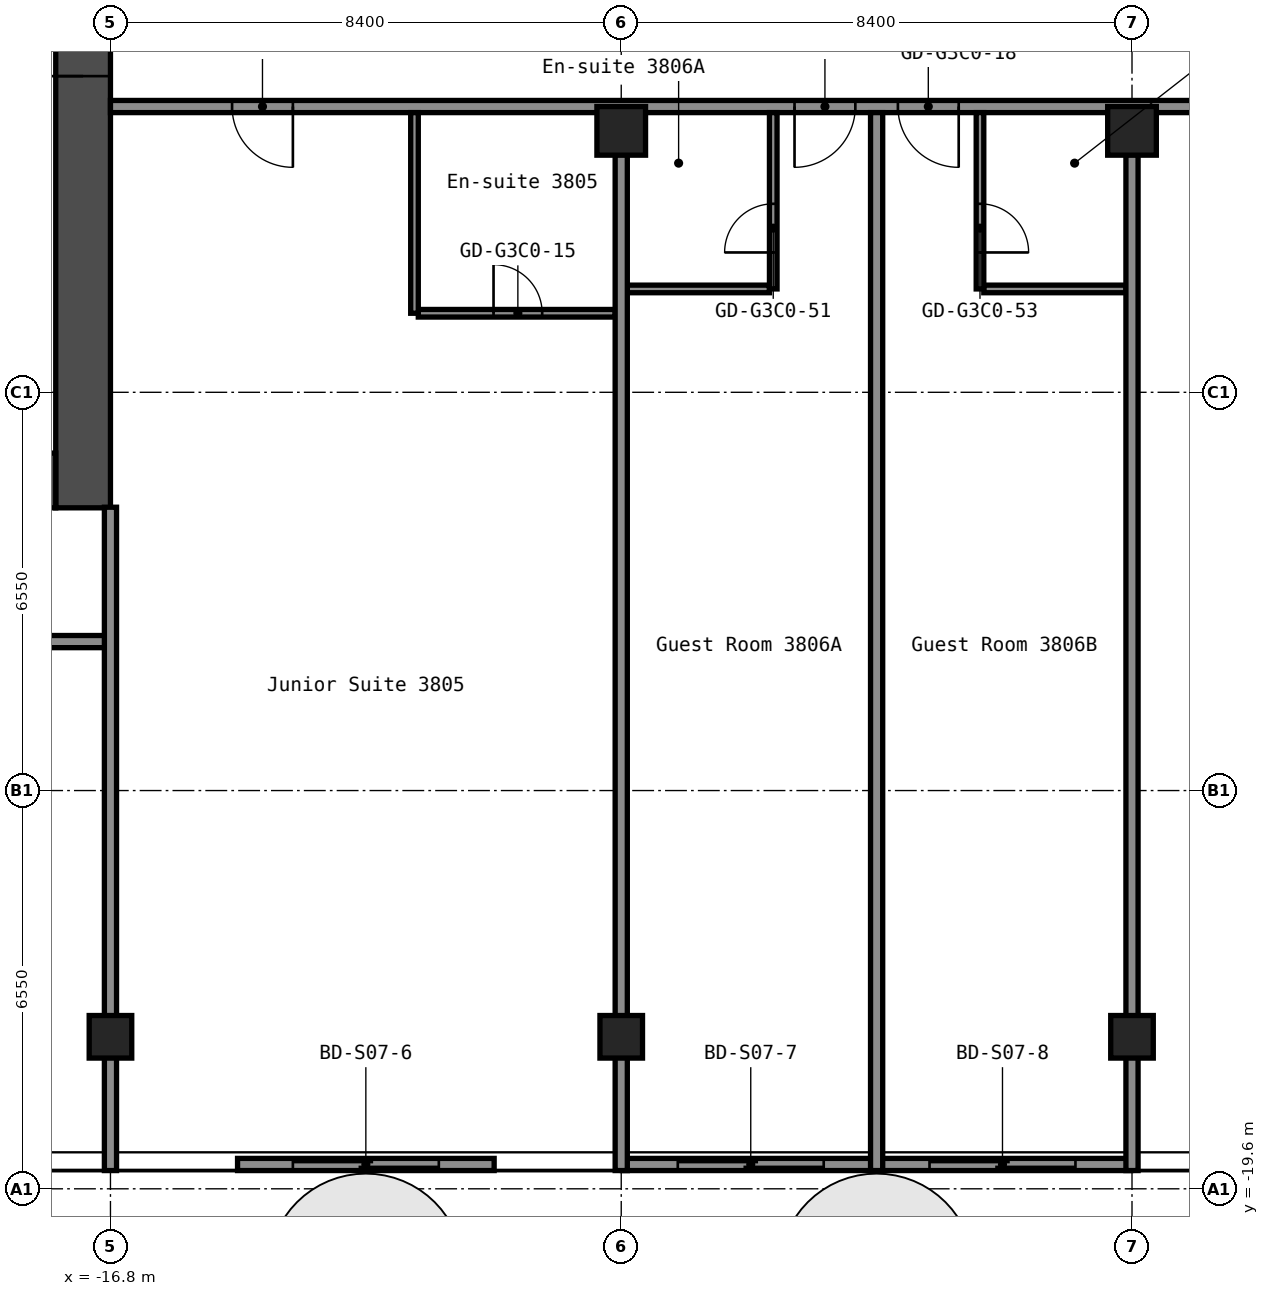
"""IFC4 building model, lengths in metres.
Left out: names, types, materials, properties, quantities, classifications, styles, units other than length and angle.
Written with IfcOpenShell. Run it as: python <this file> out.ifc"""

import sys

from ifc_helpers import new_model, si_unit, direction, frame, frame_2d, origin, origin_2d, place, context, subcontext, project, spatial, rectangle, hollow_rectangle, extrude, element, fill, save


model = new_model("IFC4")
c1 = context("Model", 3, precision=1e-05, world=origin(), true_north=direction((0.0, 1.0)))
c2 = subcontext(c1, "Body", "Model", "MODEL_VIEW")
j1 = project(units=[si_unit("LENGTHUNIT", "METRE"), si_unit("PLANEANGLEUNIT", "RADIAN")], contexts=[c1])
p1 = place(None, origin())
s1 = spatial("IfcSite", under=j1, at=p1, CompositionType="ELEMENT")
p2 = place(p1, origin())
s2 = spatial("IfcBuilding", under=s1, at=p2, CompositionType="ELEMENT")
p3 = place(p2, frame((0.0, 0.0, 137.4)))
s3 = spatial("IfcBuildingStorey", under=s2, at=p3, CompositionType="ELEMENT", Elevation=137.4)
for number, where, z_axis, x_axis in (
    (1, (-16.8, -17.1, 0.0), (0.0, 0.0, 1.0), (1.0, 0.0, 0.0)),
    (2, (-8.4, -17.1, 0.0), (0.0, 0.0, 1.0), (1.0, 0.0, 0.0)),
):
    element("IfcColumn", number, at=place(p3, frame(where, z_axis=z_axis, x_axis=x_axis)), inside=s3, PredefinedType="COLUMN", context=c2, shape_type="SweptSolid", body=[
        extrude(hollow_rectangle(XDim=0.7, YDim=0.7, WallThickness=0.028, at=origin_2d()), origin(), (0.0, 0.0, 1.0), 2.75),
    ])
p4 = place(p3, frame((-8.4, -2.2, 0.0), z_axis=(0.0, 0.0, 1.0), x_axis=(1.0, 0.0, 0.0)))
e3 = element("IfcColumn", 3, at=p4, inside=s3, PredefinedType="COLUMN", context=c2, shape_type="SweptSolid", body=[
    extrude(hollow_rectangle(XDim=0.8, YDim=0.8, WallThickness=0.032, at=origin_2d()), origin(), (0.0, 0.0, 1.0), 2.75),
])
p5 = place(p3, frame((0.0, -17.1, 0.0), z_axis=(0.0, 0.0, 1.0), x_axis=(1.0, 0.0, 0.0)))
e4 = element("IfcColumn", 4, at=p5, inside=s3, PredefinedType="COLUMN", context=c2, shape_type="SweptSolid", body=[
    extrude(hollow_rectangle(XDim=0.7, YDim=0.7, WallThickness=0.028, at=origin_2d()), origin(), (0.0, 0.0, 1.0), 2.75),
])
p6 = place(p3, frame((0.0, -2.2, 0.0), z_axis=(0.0, 0.0, 1.0), x_axis=(1.0, 0.0, 0.0)))
e5 = element("IfcColumn", 5, at=p6, inside=s3, PredefinedType="COLUMN", context=c2, shape_type="SweptSolid", body=[
    extrude(hollow_rectangle(XDim=0.8, YDim=0.8, WallThickness=0.032, at=origin_2d()), origin(), (0.0, 0.0, 1.0), 2.75),
])
p7 = place(p3, frame((-17.25, -8.4, 0.0), z_axis=(0.0, 0.0, 1.0), x_axis=(0.0, 1.0, 0.0)))
e6 = element("IfcWall", 6, at=p7, inside=s3, PredefinedType="SHEAR", context=c2, shape_type="SweptSolid", body=[
    extrude(rectangle(XDim=16.8, YDim=0.9, at=frame_2d((8.4, 0.0))), origin(), (0.0, 0.0, 1.0), 2.75),
])
p8 = place(p7, frame((7.1, 0.0, 0.0)))
e7 = element("IfcOpeningElement", 7, at=p8, cuts=e6, PredefinedType="OPENING", context=c2, shape_type="SweptSolid", body=[
    extrude(rectangle(XDim=1.6, YDim=2.1, at=frame_2d((0.8, 1.05))), frame((0.0, 0.46, 0.0), z_axis=(0.0, -1.0, 0.0), x_axis=(1.0, 0.0, 0.0)), (0.0, 0.0, 1.0), 0.92),
])
p9 = place(p3, frame((-32.7, -7.95, 0.0), z_axis=(0.0, 0.0, 1.0), x_axis=(1.0, 0.0, 0.0)))
e8 = element("IfcWall", 8, at=p9, inside=s3, PredefinedType="SHEAR", context=c2, shape_type="SweptSolid", body=[
    extrude(rectangle(XDim=15.0, YDim=0.9, at=frame_2d((7.5, 0.0))), origin(), (0.0, 0.0, 1.0), 2.75),
])
p10 = place(p9, frame((11.45, 0.0, 0.0)))
e9 = element("IfcOpeningElement", 9, at=p10, cuts=e8, PredefinedType="OPENING", context=c2, shape_type="SweptSolid", body=[
    extrude(rectangle(XDim=1.0, YDim=2.1, at=frame_2d((0.5, 1.05))), frame((0.0, 0.46, 0.0), z_axis=(0.0, -1.0, 0.0), x_axis=(1.0, 0.0, 0.0)), (0.0, 0.0, 1.0), 0.92),
])
p11 = place(p3, frame((-42.7, -10.6, 0.0), z_axis=(0.0, 0.0, 1.0), x_axis=(1.0, 0.0, 0.0)))
e10 = element("IfcWall", 10, at=p11, inside=s3, PredefinedType="PARTITIONING", context=c2, shape_type="SweptSolid", body=[
    extrude(rectangle(XDim=25.9, YDim=0.2, at=frame_2d((12.95, 0.0))), origin(), (0.0, 0.0, 1.0), 2.75),
])
p12 = place(p11, frame((2.665, 0.0, 0.0)))
e11 = element("IfcOpeningElement", 11, at=p12, cuts=e10, PredefinedType="OPENING", context=c2, shape_type="SweptSolid", body=[
    extrude(rectangle(XDim=0.9, YDim=2.1, at=frame_2d((0.45, 1.05))), frame((0.0, 0.11, 0.0), z_axis=(0.0, -1.0, 0.0), x_axis=(1.0, 0.0, 0.0)), (0.0, 0.0, 1.0), 0.22),
])
p13 = place(p11, frame((7.065, 0.0, 0.0)))
e12 = element("IfcOpeningElement", 12, at=p13, cuts=e10, PredefinedType="OPENING", context=c2, shape_type="SweptSolid", body=[
    extrude(rectangle(XDim=0.9, YDim=2.1, at=frame_2d((0.45, 1.05))), frame((0.0, 0.11, 0.0), z_axis=(0.0, -1.0, 0.0), x_axis=(1.0, 0.0, 0.0)), (0.0, 0.0, 1.0), 0.22),
])
p14 = place(p11, frame((12.8, 0.0, 0.0)))
e13 = element("IfcOpeningElement", 13, at=p14, cuts=e10, PredefinedType="OPENING", context=c2, shape_type="SweptSolid", body=[
    extrude(rectangle(XDim=1.0, YDim=2.1, at=frame_2d((0.5, 1.05))), frame((0.0, 0.11, 0.0), z_axis=(0.0, -1.0, 0.0), x_axis=(1.0, 0.0, 0.0)), (0.0, 0.0, 1.0), 0.22),
])
p15 = place(p11, frame((21.2, 0.0, 0.0)))
e14 = element("IfcOpeningElement", 14, at=p15, cuts=e10, PredefinedType="OPENING", context=c2, shape_type="SweptSolid", body=[
    extrude(rectangle(XDim=1.0, YDim=2.1, at=frame_2d((0.5, 1.05))), frame((0.0, 0.11, 0.0), z_axis=(0.0, -1.0, 0.0), x_axis=(1.0, 0.0, 0.0)), (0.0, 0.0, 1.0), 0.22),
])
p16 = place(p3, frame((-11.738, -5.2, 0.0), z_axis=(0.0, 0.0, 1.0), x_axis=(1.0, 0.0, 0.0)))
e15 = element("IfcWall", 15, at=p16, inside=s3, PredefinedType="PARTITIONING", context=c2, shape_type="SweptSolid", body=[
    extrude(rectangle(XDim=3.238, YDim=0.125, at=frame_2d((1.619, 0.0))), origin(), (0.0, 0.0, 1.0), 2.75),
])
p17 = place(p16, frame((1.238, 0.0, 0.0)))
e16 = element("IfcOpeningElement", 16, at=p17, cuts=e15, PredefinedType="OPENING", context=c2, shape_type="SweptSolid", body=[
    extrude(rectangle(XDim=0.8, YDim=2.1, at=frame_2d((0.4, 1.05))), frame((0.0, 0.073, 0.0), z_axis=(0.0, -1.0, 0.0), x_axis=(1.0, 0.0, 0.0)), (0.0, 0.0, 1.0), 0.145),
])
p18 = place(p3, frame((-8.3, -4.8, 0.0), z_axis=(0.0, 0.0, 1.0), x_axis=(1.0, 0.0, 0.0)))
e17 = element("IfcWall", 17, at=p18, inside=s3, PredefinedType="PARTITIONING", context=c2, shape_type="SweptSolid", body=[
    extrude(rectangle(XDim=2.338, YDim=0.125, at=frame_2d((1.169, 0.0))), origin(), (0.0, 0.0, 1.0), 2.75),
])
p19 = place(p3, frame((-2.438, -4.8, 0.0), z_axis=(0.0, 0.0, 1.0), x_axis=(1.0, 0.0, 0.0)))
e18 = element("IfcWall", 18, at=p19, inside=s3, PredefinedType="PARTITIONING", context=c2, shape_type="SweptSolid", body=[
    extrude(rectangle(XDim=2.337, YDim=0.125, at=frame_2d((1.169, 0.0))), origin(), (0.0, 0.0, 1.0), 2.75),
])
p20 = place(p3, frame((-16.8, -1.8, 0.0), z_axis=(0.0, 0.0, 1.0), x_axis=(1.0, 0.0, 0.0)))
e19 = element("IfcWall", 19, at=p20, inside=s3, PredefinedType="PARTITIONING", context=c2, shape_type="SweptSolid", body=[
    extrude(rectangle(XDim=33.6, YDim=0.2, at=frame_2d((16.8, 0.0))), origin(), (0.0, 0.0, 1.0), 2.75),
])
p21 = place(p20, frame((2.0, 0.0, 0.0)))
e20 = element("IfcOpeningElement", 20, at=p21, cuts=e19, PredefinedType="OPENING", context=c2, shape_type="SweptSolid", body=[
    extrude(rectangle(XDim=1.0, YDim=2.1, at=frame_2d((0.5, 1.05))), frame((0.0, 0.11, 0.0), z_axis=(0.0, -1.0, 0.0), x_axis=(1.0, 0.0, 0.0)), (0.0, 0.0, 1.0), 0.22),
])
p22 = place(p20, frame((11.25, 0.0, 0.0)))
e21 = element("IfcOpeningElement", 21, at=p22, cuts=e19, PredefinedType="OPENING", context=c2, shape_type="SweptSolid", body=[
    extrude(rectangle(XDim=1.0, YDim=2.1, at=frame_2d((0.5, 1.05))), frame((0.0, 0.11, 0.0), z_axis=(0.0, -1.0, 0.0), x_axis=(1.0, 0.0, 0.0)), (0.0, 0.0, 1.0), 0.22),
])
p23 = place(p20, frame((12.95, 0.0, 0.0)))
e22 = element("IfcOpeningElement", 22, at=p23, cuts=e19, PredefinedType="OPENING", context=c2, shape_type="SweptSolid", body=[
    extrude(rectangle(XDim=1.0, YDim=2.1, at=frame_2d((0.5, 1.05))), frame((0.0, 0.11, 0.0), z_axis=(0.0, -1.0, 0.0), x_axis=(1.0, 0.0, 0.0)), (0.0, 0.0, 1.0), 0.22),
])
p24 = place(p20, frame((17.86, 0.0, 0.0)))
e23 = element("IfcOpeningElement", 23, at=p24, cuts=e19, PredefinedType="OPENING", context=c2, shape_type="SweptSolid", body=[
    extrude(rectangle(XDim=0.9, YDim=2.1, at=frame_2d((0.45, 1.05))), frame((0.0, 0.11, 0.0), z_axis=(0.0, -1.0, 0.0), x_axis=(1.0, 0.0, 0.0)), (0.0, 0.0, 1.0), 0.22),
])
p25 = place(p20, frame((22.06, 0.0, 0.0)))
e24 = element("IfcOpeningElement", 24, at=p25, cuts=e19, PredefinedType="OPENING", context=c2, shape_type="SweptSolid", body=[
    extrude(rectangle(XDim=0.9, YDim=2.1, at=frame_2d((0.45, 1.05))), frame((0.0, 0.11, 0.0), z_axis=(0.0, -1.0, 0.0), x_axis=(1.0, 0.0, 0.0)), (0.0, 0.0, 1.0), 0.22),
])
p26 = place(p20, frame((28.05, 0.0, 0.0)))
e25 = element("IfcOpeningElement", 25, at=p26, cuts=e19, PredefinedType="OPENING", context=c2, shape_type="SweptSolid", body=[
    extrude(rectangle(XDim=1.0, YDim=2.1, at=frame_2d((0.5, 1.05))), frame((0.0, 0.11, 0.0), z_axis=(0.0, -1.0, 0.0), x_axis=(1.0, 0.0, 0.0)), (0.0, 0.0, 1.0), 0.22),
])
p27 = place(p20, frame((29.75, 0.0, 0.0)))
e26 = element("IfcOpeningElement", 26, at=p27, cuts=e19, PredefinedType="OPENING", context=c2, shape_type="SweptSolid", body=[
    extrude(rectangle(XDim=1.0, YDim=2.1, at=frame_2d((0.5, 1.05))), frame((0.0, 0.11, 0.0), z_axis=(0.0, -1.0, 0.0), x_axis=(1.0, 0.0, 0.0)), (0.0, 0.0, 1.0), 0.22),
])
p28 = place(p3, frame((-16.8, -19.3, 0.0), z_axis=(0.0, 0.0, 1.0), x_axis=(0.0, 1.0, 0.0)))
e27 = element("IfcWall", 27, at=p28, inside=s3, PredefinedType="PARTITIONING", context=c2, shape_type="SweptSolid", body=[
    extrude(rectangle(XDim=10.91, YDim=0.2, at=frame_2d((5.455, 0.0))), origin(), (0.0, 0.0, 1.0), 2.75),
])
p29 = place(p3, frame((-11.8, -5.2, 0.0), z_axis=(0.0, 0.0, 1.0), x_axis=(0.0, 1.0, 0.0)))
e28 = element("IfcWall", 28, at=p29, inside=s3, PredefinedType="PARTITIONING", context=c2, shape_type="SweptSolid", body=[
    extrude(rectangle(XDim=3.3, YDim=0.125, at=frame_2d((1.65, 0.0))), origin(), (0.0, 0.0, 1.0), 2.75),
])
p30 = place(p3, frame((-8.4, -19.3, 0.0), z_axis=(0.0, 0.0, 1.0), x_axis=(0.0, 1.0, 0.0)))
e29 = element("IfcWall", 29, at=p30, inside=s3, PredefinedType="PARTITIONING", context=c2, shape_type="SweptSolid", body=[
    extrude(rectangle(XDim=16.71, YDim=0.2, at=frame_2d((8.355, 0.0))), origin(), (0.0, 0.0, 1.0), 2.75),
])
p31 = place(p3, frame((-5.9, -4.8, 0.0), z_axis=(0.0, 0.0, 1.0), x_axis=(0.0, 1.0, 0.0)))
e30 = element("IfcWall", 30, at=p31, inside=s3, PredefinedType="PARTITIONING", context=c2, shape_type="SweptSolid", body=[
    extrude(rectangle(XDim=2.9, YDim=0.125, at=frame_2d((1.45, 0.0))), origin(), (0.0, 0.0, 1.0), 2.75),
])
p32 = place(p31, frame((0.6, 0.0, 0.0)))
e31 = element("IfcOpeningElement", 31, at=p32, cuts=e30, PredefinedType="OPENING", context=c2, shape_type="SweptSolid", body=[
    extrude(rectangle(XDim=0.8, YDim=2.1, at=frame_2d((0.4, 1.05))), frame((0.0, 0.073, 0.0), z_axis=(0.0, -1.0, 0.0), x_axis=(1.0, 0.0, 0.0)), (0.0, 0.0, 1.0), 0.145),
])
p33 = place(p3, frame((-4.2, -19.3, 0.0), z_axis=(0.0, 0.0, 1.0), x_axis=(0.0, 1.0, 0.0)))
e32 = element("IfcWall", 32, at=p33, inside=s3, PredefinedType="PARTITIONING", context=c2, shape_type="SweptSolid", body=[
    extrude(rectangle(XDim=17.4, YDim=0.2, at=frame_2d((8.7, 0.0))), origin(), (0.0, 0.0, 1.0), 2.75),
])
p34 = place(p3, frame((-2.5, -4.8, 0.0), z_axis=(0.0, 0.0, 1.0), x_axis=(0.0, 1.0, 0.0)))
e33 = element("IfcWall", 33, at=p34, inside=s3, PredefinedType="PARTITIONING", context=c2, shape_type="SweptSolid", body=[
    extrude(rectangle(XDim=2.9, YDim=0.125, at=frame_2d((1.45, 0.0))), origin(), (0.0, 0.0, 1.0), 2.75),
])
p35 = place(p34, frame((0.6, 0.0, 0.0)))
e34 = element("IfcOpeningElement", 34, at=p35, cuts=e33, PredefinedType="OPENING", context=c2, shape_type="SweptSolid", body=[
    extrude(rectangle(XDim=0.8, YDim=2.1, at=frame_2d((0.4, 1.05))), frame((0.0, 0.073, 0.0), z_axis=(0.0, -1.0, 0.0), x_axis=(1.0, 0.0, 0.0)), (0.0, 0.0, 1.0), 0.145),
])
p36 = place(p3, frame((0.0, -19.3, 0.0), z_axis=(0.0, 0.0, 1.0), x_axis=(0.0, 1.0, 0.0)))
e35 = element("IfcWall", 35, at=p36, inside=s3, PredefinedType="PARTITIONING", context=c2, shape_type="SweptSolid", body=[
    extrude(rectangle(XDim=16.71, YDim=0.2, at=frame_2d((8.355, 0.0))), origin(), (0.0, 0.0, 1.0), 2.75),
])
p37 = place(p3, frame((-14.71, -19.2, 0.0), z_axis=(0.0, 0.0, 1.0), x_axis=(1.0, 0.0, 0.0)))
p38 = place(p37, frame((0.91, 0.0, 0.0)))
p39 = place(p38, frame((2.4, 0.0, 0.0), z_axis=(0.0, 0.0, 1.0), x_axis=(-1.0, 0.0, 0.0)))
e36 = element("IfcDoor", 36, at=p39, inside=s3, OperationType="SLIDING_TO_LEFT", PredefinedType="DOOR", context=c2, shape_type="SweptSolid", body=[
    extrude(rectangle(XDim=2.4, YDim=2.2, at=frame_2d((1.2, 1.1))), frame((0.0, 0.025, 0.0), z_axis=(0.0, -1.0, 0.0), x_axis=(1.0, 0.0, 0.0)), (0.0, 0.0, 1.0), 0.05),
])
p40 = place(p3, frame((-8.38, -19.2, 0.0), z_axis=(0.0, 0.0, 1.0), x_axis=(1.0, 0.0, 0.0)))
p41 = place(p40, frame((0.91, 0.0, 0.0)))
p42 = place(p41, frame((2.4, 0.0, 0.0), z_axis=(0.0, 0.0, 1.0), x_axis=(-1.0, 0.0, 0.0)))
e37 = element("IfcDoor", 37, at=p42, inside=s3, OperationType="SLIDING_TO_LEFT", PredefinedType="DOOR", context=c2, shape_type="SweptSolid", body=[
    extrude(rectangle(XDim=2.4, YDim=2.2, at=frame_2d((1.2, 1.1))), frame((0.0, 0.025, 0.0), z_axis=(0.0, -1.0, 0.0), x_axis=(1.0, 0.0, 0.0)), (0.0, 0.0, 1.0), 0.05),
])
p43 = place(p3, frame((-4.24, -19.2, 0.0), z_axis=(0.0, 0.0, 1.0), x_axis=(1.0, 0.0, 0.0)))
p44 = place(p43, frame((0.91, 0.0, 0.0)))
p45 = place(p44, frame((2.4, 0.0, 0.0), z_axis=(0.0, 0.0, 1.0), x_axis=(-1.0, 0.0, 0.0)))
e38 = element("IfcDoor", 38, at=p45, inside=s3, OperationType="SLIDING_TO_LEFT", PredefinedType="DOOR", context=c2, shape_type="SweptSolid", body=[
    extrude(rectangle(XDim=2.4, YDim=2.2, at=frame_2d((1.2, 1.1))), frame((0.0, 0.025, 0.0), z_axis=(0.0, -1.0, 0.0), x_axis=(1.0, 0.0, 0.0)), (0.0, 0.0, 1.0), 0.05),
])
p46 = place(p8, origin())
e39 = element("IfcDoor", 39, at=p46, inside=s3, OperationType="DOUBLE_DOOR_SINGLE_SWING", PredefinedType="DOOR", context=c2, shape_type="SweptSolid", body=[
    extrude(rectangle(XDim=1.6, YDim=2.1, at=frame_2d((0.8, 1.05))), frame((0.0, 0.025, 0.0), z_axis=(0.0, -1.0, 0.0), x_axis=(1.0, 0.0, 0.0)), (0.0, 0.0, 1.0), 0.05),
])
fill(e7, e39)
p47 = place(p17, origin())
e40 = element("IfcDoor", 40, at=p47, inside=s3, OperationType="SINGLE_SWING_RIGHT", PredefinedType="DOOR", context=c2, shape_type="SweptSolid", body=[
    extrude(rectangle(XDim=0.8, YDim=2.1, at=frame_2d((0.4, 1.05))), frame((0.0, 0.025, 0.0), z_axis=(0.0, -1.0, 0.0), x_axis=(1.0, 0.0, 0.0)), (0.0, 0.0, 1.0), 0.05),
])
fill(e16, e40)
p48 = place(p21, origin())
e41 = element("IfcDoor", 41, at=p48, inside=s3, OperationType="SINGLE_SWING_RIGHT", PredefinedType="DOOR", context=c2, shape_type="SweptSolid", body=[
    extrude(rectangle(XDim=1.0, YDim=2.1, at=frame_2d((0.5, 1.05))), frame((0.0, 0.025, 0.0), z_axis=(0.0, -1.0, 0.0), x_axis=(1.0, 0.0, 0.0)), (0.0, 0.0, 1.0), 0.05),
])
fill(e20, e41)
p49 = place(p22, origin())
e42 = element("IfcDoor", 42, at=p49, inside=s3, OperationType="SINGLE_SWING_LEFT", PredefinedType="DOOR", context=c2, shape_type="SweptSolid", body=[
    extrude(rectangle(XDim=1.0, YDim=2.1, at=frame_2d((0.5, 1.05))), frame((0.0, 0.025, 0.0), z_axis=(0.0, -1.0, 0.0), x_axis=(1.0, 0.0, 0.0)), (0.0, 0.0, 1.0), 0.05),
])
fill(e21, e42)
p50 = place(p23, origin())
e43 = element("IfcDoor", 43, at=p50, inside=s3, OperationType="SINGLE_SWING_RIGHT", PredefinedType="DOOR", context=c2, shape_type="SweptSolid", body=[
    extrude(rectangle(XDim=1.0, YDim=2.1, at=frame_2d((0.5, 1.05))), frame((0.0, 0.025, 0.0), z_axis=(0.0, -1.0, 0.0), x_axis=(1.0, 0.0, 0.0)), (0.0, 0.0, 1.0), 0.05),
])
fill(e22, e43)
p51 = place(p32, origin())
e44 = element("IfcDoor", 44, at=p51, inside=s3, OperationType="SINGLE_SWING_RIGHT", PredefinedType="DOOR", context=c2, shape_type="SweptSolid", body=[
    extrude(rectangle(XDim=0.8, YDim=2.1, at=frame_2d((0.4, 1.05))), frame((0.0, 0.025, 0.0), z_axis=(0.0, -1.0, 0.0), x_axis=(1.0, 0.0, 0.0)), (0.0, 0.0, 1.0), 0.05),
])
fill(e31, e44)
p52 = place(p35, origin())
e45 = element("IfcDoor", 45, at=p52, inside=s3, OperationType="SINGLE_SWING_LEFT", PredefinedType="DOOR", context=c2, shape_type="SweptSolid", body=[
    extrude(rectangle(XDim=0.8, YDim=2.1, at=frame_2d((0.4, 1.05))), frame((0.0, 0.025, 0.0), z_axis=(0.0, -1.0, 0.0), x_axis=(1.0, 0.0, 0.0)), (0.0, 0.0, 1.0), 0.05),
])
fill(e34, e45)
save(model, sys.argv[1])
